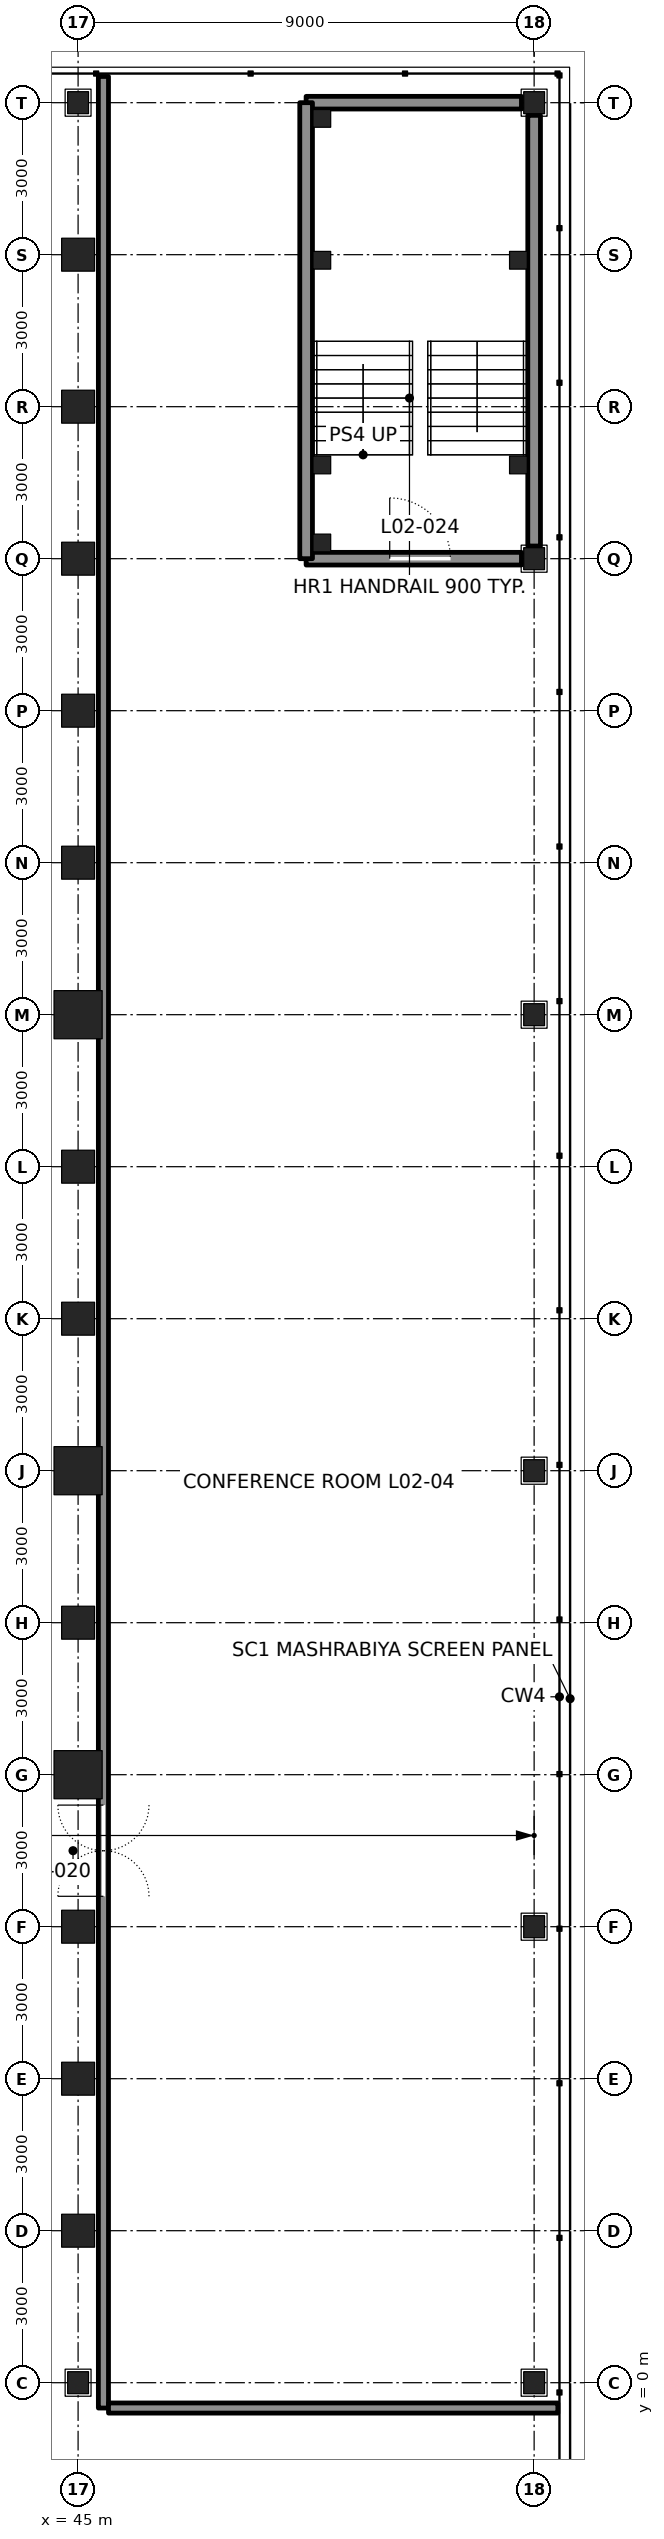
"""IFC4 building model, lengths in metres.
Left out: names, types, materials, properties, quantities, classifications, styles, units other than length and angle.
Written with IfcOpenShell. Run it as: python <this file> out.ifc"""

import sys

from ifc_helpers import new_model, si_unit, direction, frame, frame_2d, origin, origin_2d, place, context, subcontext, project, spatial, rectangle, hollow_rectangle, i_section, extrude, element, fill, save


model = new_model("IFC4")
c1 = context("Model", 3, precision=1e-05, world=origin(), true_north=direction((0.0, 1.0)))
c2 = subcontext(c1, "Body", "Model", "MODEL_VIEW")
j1 = project(units=[si_unit("LENGTHUNIT", "METRE"), si_unit("PLANEANGLEUNIT", "RADIAN")], contexts=[c1])
p1 = place(None, origin())
s1 = spatial("IfcSite", under=j1, at=p1, CompositionType="ELEMENT")
p2 = place(p1, origin())
s2 = spatial("IfcBuilding", under=s1, at=p2, CompositionType="ELEMENT")
p3 = place(p2, frame((0.0, 0.0, 13.5)))
s3 = spatial("IfcBuildingStorey", under=s2, at=p3, CompositionType="ELEMENT", Elevation=13.5)
for number, where, z_axis, x_axis in (
    (1, (45.0, 3.0, 0.0), (0.0, 0.0, 1.0), (1.0, 0.0, 0.0)),
    (2, (45.0, 6.0, 0.0), (0.0, 0.0, 1.0), (1.0, 0.0, 0.0)),
    (3, (45.0, 9.0, 0.0), (0.0, 0.0, 1.0), (1.0, 0.0, 0.0)),
):
    element("IfcColumn", number, at=place(p3, frame(where, z_axis=z_axis, x_axis=x_axis)), inside=s3, PredefinedType="COLUMN", context=c2, shape_type="SweptSolid", body=[
        extrude(hollow_rectangle(XDim=0.65, YDim=0.65, WallThickness=0.065, at=origin_2d()), origin(), (0.0, 0.0, 1.0), 6.0),
    ])
p4 = place(p3, frame((45.0, 12.0, 0.0), z_axis=(0.0, 0.0, 1.0), x_axis=(1.0, 0.0, 0.0)))
e4 = element("IfcColumn", 4, at=p4, inside=s3, PredefinedType="COLUMN", context=c2, shape_type="SweptSolid", body=[
    extrude(hollow_rectangle(XDim=0.95, YDim=0.95, WallThickness=0.11, at=origin_2d()), origin(), (0.0, 0.0, 1.0), 6.0),
])
p5 = place(p3, frame((45.0, 15.0, 0.0), z_axis=(0.0, 0.0, 1.0), x_axis=(1.0, 0.0, 0.0)))
e5 = element("IfcColumn", 5, at=p5, inside=s3, PredefinedType="COLUMN", context=c2, shape_type="SweptSolid", body=[
    extrude(hollow_rectangle(XDim=0.65, YDim=0.65, WallThickness=0.065, at=origin_2d()), origin(), (0.0, 0.0, 1.0), 6.0),
])
p6 = place(p3, frame((45.0, 18.0, 0.0), z_axis=(0.0, 0.0, 1.0), x_axis=(1.0, 0.0, 0.0)))
e6 = element("IfcColumn", 6, at=p6, inside=s3, PredefinedType="COLUMN", context=c2, shape_type="SweptSolid", body=[
    extrude(hollow_rectangle(XDim=0.95, YDim=0.95, WallThickness=0.11, at=origin_2d()), origin(), (0.0, 0.0, 1.0), 6.0),
])
for number, where, z_axis, x_axis in (
    (7, (45.0, 21.0, 0.0), (0.0, 0.0, 1.0), (1.0, 0.0, 0.0)),
    (8, (45.0, 24.0, 0.0), (0.0, 0.0, 1.0), (1.0, 0.0, 0.0)),
):
    element("IfcColumn", number, at=place(p3, frame(where, z_axis=z_axis, x_axis=x_axis)), inside=s3, PredefinedType="COLUMN", context=c2, shape_type="SweptSolid", body=[
        extrude(hollow_rectangle(XDim=0.65, YDim=0.65, WallThickness=0.065, at=origin_2d()), origin(), (0.0, 0.0, 1.0), 6.0),
    ])
p7 = place(p3, frame((45.0, 27.0, 0.0), z_axis=(0.0, 0.0, 1.0), x_axis=(1.0, 0.0, 0.0)))
e9 = element("IfcColumn", 9, at=p7, inside=s3, PredefinedType="COLUMN", context=c2, shape_type="SweptSolid", body=[
    extrude(hollow_rectangle(XDim=0.95, YDim=0.95, WallThickness=0.11, at=origin_2d()), origin(), (0.0, 0.0, 1.0), 6.0),
])
for number, where, z_axis, x_axis in (
    (10, (45.0, 30.0, 0.0), (0.0, 0.0, 1.0), (1.0, 0.0, 0.0)),
    (11, (45.0, 33.0, 0.0), (0.0, 0.0, 1.0), (1.0, 0.0, 0.0)),
    (12, (45.0, 36.0, 0.0), (0.0, 0.0, 1.0), (1.0, 0.0, 0.0)),
    (13, (45.0, 39.0, 0.0), (0.0, 0.0, 1.0), (1.0, 0.0, 0.0)),
    (14, (45.0, 42.0, 0.0), (0.0, 0.0, 1.0), (1.0, 0.0, 0.0)),
):
    element("IfcColumn", number, at=place(p3, frame(where, z_axis=z_axis, x_axis=x_axis)), inside=s3, PredefinedType="COLUMN", context=c2, shape_type="SweptSolid", body=[
        extrude(hollow_rectangle(XDim=0.65, YDim=0.65, WallThickness=0.065, at=origin_2d()), origin(), (0.0, 0.0, 1.0), 6.0),
    ])
for number, where, z_axis, x_axis in (
    (15, (45.0, 0.0, 0.0), (0.0, 0.0, 1.0), (1.0, 0.0, 0.0)),
    (16, (45.0, 45.0, 0.0), (0.0, 0.0, 1.0), (1.0, 0.0, 0.0)),
    (17, (54.0, 0.0, 0.0), (0.0, 0.0, 1.0), (1.0, 0.0, 0.0)),
    (18, (54.0, 9.0, 0.0), (0.0, 0.0, 1.0), (1.0, 0.0, 0.0)),
    (19, (54.0, 18.0, 0.0), (0.0, 0.0, 1.0), (1.0, 0.0, 0.0)),
    (20, (54.0, 27.0, 0.0), (0.0, 0.0, 1.0), (1.0, 0.0, 0.0)),
    (21, (54.0, 36.0, 0.0), (0.0, 0.0, 1.0), (1.0, 0.0, 0.0)),
    (22, (54.0, 45.0, 0.0), (0.0, 0.0, 1.0), (1.0, 0.0, 0.0)),
):
    element("IfcColumn", number, at=place(p3, frame(where, z_axis=z_axis, x_axis=x_axis)), inside=s3, PredefinedType="COLUMN", context=c2, shape_type="SweptSolid", body=[
        extrude(i_section(OverallWidth=0.411, OverallDepth=0.434, WebThickness=0.036, FlangeThickness=0.057, at=origin_2d()), origin(), (0.0, 0.0, 1.0), 6.0),
    ])
p8 = place(p3, frame((45.5, -0.5, 0.0), z_axis=(0.0, 0.0, 1.0), x_axis=(0.0, 1.0, 0.0)))
e23 = element("IfcWall", 23, at=p8, inside=s3, PredefinedType="PARTITIONING", context=c2, shape_type="SweptSolid", body=[
    extrude(rectangle(XDim=46.018, YDim=0.2, at=frame_2d((23.009, 0.0))), origin(), (0.0, 0.0, 1.0), 5.8),
])
p9 = place(p8, frame((10.1, 0.0, 0.0)))
e24 = element("IfcOpeningElement", 24, at=p9, cuts=e23, PredefinedType="OPENING", context=c2, shape_type="SweptSolid", body=[
    extrude(rectangle(XDim=1.8, YDim=2.4, at=frame_2d((0.9, 1.2))), frame((0.0, 0.11, 0.0), z_axis=(0.0, -1.0, 0.0), x_axis=(1.0, 0.0, 0.0)), (0.0, 0.0, 1.0), 0.22),
])
p10 = place(p3, frame((45.6, -0.5, 0.0), z_axis=(0.0, 0.0, 1.0), x_axis=(1.0, 0.0, 0.0)))
e25 = element("IfcWall", 25, at=p10, inside=s3, PredefinedType="PARTITIONING", context=c2, shape_type="SweptSolid", body=[
    extrude(rectangle(XDim=8.868, YDim=0.2, at=frame_2d((4.434, 0.0))), origin(), (0.0, 0.0, 1.0), 5.8),
])
p11 = place(p3, frame((49.5, 36.0, 0.0), z_axis=(0.0, 0.0, 1.0), x_axis=(1.0, 0.0, 0.0)))
e26 = element("IfcWall", 26, at=p11, inside=s3, PredefinedType="SOLIDWALL", context=c2, shape_type="SweptSolid", body=[
    extrude(rectangle(XDim=4.25, YDim=0.25, at=frame_2d((2.125, 0.0))), origin(), (0.0, 0.0, 1.0), 4.853),
])
p12 = place(p11, frame((1.65, 0.0, 0.0)))
e27 = element("IfcOpeningElement", 27, at=p12, cuts=e26, PredefinedType="OPENING", context=c2, shape_type="SweptSolid", body=[
    extrude(rectangle(XDim=1.2, YDim=2.1, at=frame_2d((0.6, 1.05))), frame((0.0, 0.135, 0.0), z_axis=(0.0, -1.0, 0.0), x_axis=(1.0, 0.0, 0.0)), (0.0, 0.0, 1.0), 0.27),
])
p13 = place(p3, frame((54.0, 36.25, 0.0), z_axis=(0.0, 0.0, 1.0), x_axis=(0.0, 1.0, 0.0)))
e28 = element("IfcWall", 28, at=p13, inside=s3, PredefinedType="SOLIDWALL", context=c2, shape_type="SweptSolid", body=[
    extrude(rectangle(XDim=8.5, YDim=0.25, at=frame_2d((4.25, 0.0))), origin(), (0.0, 0.0, 1.0), 4.853),
])
p14 = place(p3, frame((49.5, 45.0, 0.0), z_axis=(0.0, 0.0, 1.0), x_axis=(1.0, 0.0, 0.0)))
e29 = element("IfcWall", 29, at=p14, inside=s3, PredefinedType="SOLIDWALL", context=c2, shape_type="SweptSolid", body=[
    extrude(rectangle(XDim=4.25, YDim=0.25, at=frame_2d((2.125, 0.0))), origin(), (0.0, 0.0, 1.0), 4.853),
])
p15 = place(p3, frame((49.5, 36.0, 0.0), z_axis=(0.0, 0.0, 1.0), x_axis=(0.0, 1.0, 0.0)))
e30 = element("IfcWall", 30, at=p15, inside=s3, PredefinedType="SOLIDWALL", context=c2, shape_type="SweptSolid", body=[
    extrude(rectangle(XDim=9.0, YDim=0.25, at=frame_2d((4.5, 0.0))), origin(), (0.0, 0.0, 1.0), 4.853),
])
for number, where, z_axis, x_axis in (
    (31, (49.81, 44.69, 0.0), (0.0, 0.0, 1.0), (1.0, 0.0, 0.0)),
    (32, (49.81, 41.89, 0.0), (0.0, 0.0, 1.0), (1.0, 0.0, 0.0)),
    (33, (53.69, 41.89, 0.0), (0.0, 0.0, 1.0), (1.0, 0.0, 0.0)),
    (34, (49.81, 37.85, 0.0), (0.0, 0.0, 1.0), (1.0, 0.0, 0.0)),
    (35, (53.69, 37.85, 0.0), (0.0, 0.0, 1.0), (1.0, 0.0, 0.0)),
    (36, (49.81, 36.31, 0.0), (0.0, 0.0, 1.0), (1.0, 0.0, 0.0)),
):
    element("IfcColumn", number, at=place(p3, frame(where, z_axis=z_axis, x_axis=x_axis)), inside=s3, PredefinedType="COLUMN", context=c2, shape_type="SweptSolid", body=[
        extrude(hollow_rectangle(XDim=0.35, YDim=0.35, WallThickness=0.035, at=origin_2d()), origin(), (0.0, 0.0, 1.0), 5.8),
    ])
p16 = place(p9, origin())
e37 = element("IfcDoor", 37, at=p16, inside=s3, OperationType="DOUBLE_DOOR_DOUBLE_SWING", PredefinedType="DOOR", context=c2, shape_type="SweptSolid", body=[
    extrude(rectangle(XDim=1.8, YDim=2.4, at=frame_2d((0.9, 1.2))), frame((0.0, 0.025, 0.0), z_axis=(0.0, -1.0, 0.0), x_axis=(1.0, 0.0, 0.0)), (0.0, 0.0, 1.0), 0.05),
])
fill(e24, e37)
p17 = place(p12, origin())
e38 = element("IfcDoor", 38, at=p17, inside=s3, OperationType="SINGLE_SWING_LEFT", PredefinedType="DOOR", context=c2, shape_type="SweptSolid", body=[
    extrude(rectangle(XDim=1.2, YDim=2.1, at=frame_2d((0.6, 1.05))), frame((0.0, 0.025, 0.0), z_axis=(0.0, -1.0, 0.0), x_axis=(1.0, 0.0, 0.0)), (0.0, 0.0, 1.0), 0.05),
])
fill(e27, e38)
save(model, sys.argv[1])
